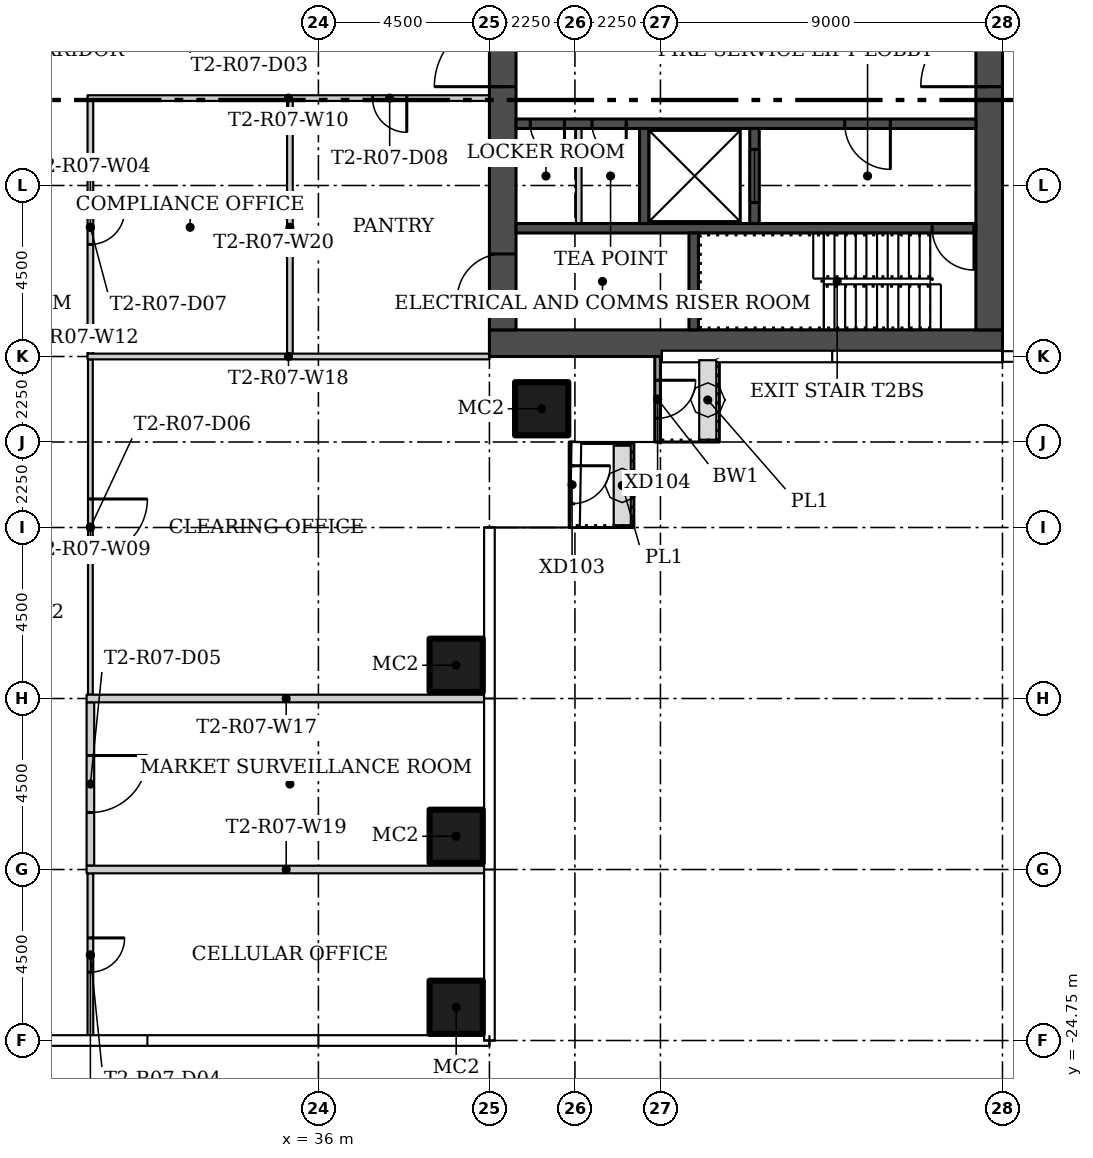
"""IFC4 building model, lengths in metres.
Left out: names, types, materials, properties, quantities, classifications, styles, units other than length and angle.
Written with IfcOpenShell. Run it as: python <this file> out.ifc"""

import sys

from ifc_helpers import new_model, si_unit, direction, frame, frame_2d, origin, origin_2d, place, context, subcontext, project, spatial, rectangle, hollow_rectangle, extrude, element, fill, save


model = new_model("IFC4")
c1 = context("Model", 3, precision=1e-05, world=origin(), true_north=direction((0.0, 1.0)))
c2 = subcontext(c1, "Body", "Model", "MODEL_VIEW")
j1 = project(units=[si_unit("LENGTHUNIT", "METRE"), si_unit("PLANEANGLEUNIT", "RADIAN")], contexts=[c1])
p1 = place(None, origin())
s1 = spatial("IfcSite", under=j1, at=p1, CompositionType="ELEMENT")
p2 = place(p1, origin())
s2 = spatial("IfcBuilding", under=s1, at=p2, CompositionType="ELEMENT")
p3 = place(p2, frame((0.0, 0.0, 73.2)))
s3 = spatial("IfcBuildingStorey", under=s2, at=p3, CompositionType="ELEMENT", Elevation=73.2)
for number, where in (
    (1, (41.875, -8.125, 0.0)),
    (2, (39.625, -14.875, 0.0)),
    (3, (39.625, -19.375, 0.0)),
    (4, (39.625, -23.875, 0.0)),
):
    element("IfcColumn", number, at=place(p3, frame(where)), inside=s3, PredefinedType="COLUMN", context=c2, shape_type="SweptSolid", body=[
        extrude(hollow_rectangle(XDim=1.4, YDim=1.4, WallThickness=0.05, at=origin_2d()), origin(), (0.0, 0.0, 1.0), 3.45),
    ])
p4 = place(p3, frame((30.0, -15.85, 0.0), z_axis=(0.0, 0.0, 1.0), x_axis=(0.0, -1.0, 0.0)))
e5 = element("IfcWall", 5, at=p4, inside=s3, PredefinedType="PARTITIONING", context=c2, shape_type="SweptSolid", body=[
    extrude(rectangle(XDim=4.3, YDim=0.2, at=frame_2d((2.15, 0.0))), origin(), (0.0, 0.0, 1.0), 3.45),
])
p5 = place(p4, frame((1.4, 0.0, 0.0)))
e6 = element("IfcOpeningElement", 6, at=p5, cuts=e5, PredefinedType="OPENING", context=c2, shape_type="SweptSolid", body=[
    extrude(rectangle(XDim=1.5, YDim=2.1, at=frame_2d((0.75, 1.05))), frame((0.0, 0.11, 0.0), z_axis=(0.0, -1.0, 0.0), x_axis=(1.0, 0.0, 0.0)), (0.0, 0.0, 1.0), 0.22),
])
p6 = place(p3, frame((30.0, -20.35, 0.0), z_axis=(0.0, 0.0, 1.0), x_axis=(0.0, -1.0, 0.0)))
e7 = element("IfcWall", 7, at=p6, inside=s3, PredefinedType="PARTITIONING", context=c2, shape_type="SweptSolid", body=[
    extrude(rectangle(XDim=4.305, YDim=0.15, at=frame_2d((2.152, 0.0))), origin(), (0.0, 0.0, 1.0), 3.45),
])
p7 = place(p6, frame((1.7, 0.0, 0.0)))
e8 = element("IfcOpeningElement", 8, at=p7, cuts=e7, PredefinedType="OPENING", context=c2, shape_type="SweptSolid", body=[
    extrude(rectangle(XDim=0.9, YDim=2.1, at=frame_2d((0.45, 1.05))), frame((0.0, 0.085, 0.0), z_axis=(0.0, -1.0, 0.0), x_axis=(1.0, 0.0, 0.0)), (0.0, 0.0, 1.0), 0.17),
])
p8 = place(p3, frame((30.0, -0.025, 0.0), z_axis=(0.0, 0.0, 1.0), x_axis=(0.0, -1.0, 0.0)))
e9 = element("IfcWall", 9, at=p8, inside=s3, PredefinedType="PARTITIONING", context=c2, shape_type="SweptSolid", body=[
    extrude(rectangle(XDim=6.65, YDim=0.15, at=frame_2d((3.325, 0.0))), origin(), (0.0, 0.0, 1.0), 3.45),
])
p9 = place(p8, frame((2.875, 0.0, 0.0)))
e10 = element("IfcOpeningElement", 10, at=p9, cuts=e9, PredefinedType="OPENING", context=c2, shape_type="SweptSolid", body=[
    extrude(rectangle(XDim=0.9, YDim=2.1, at=frame_2d((0.45, 1.05))), frame((0.0, 0.085, 0.0), z_axis=(0.0, -1.0, 0.0), x_axis=(1.0, 0.0, 0.0)), (0.0, 0.0, 1.0), 0.17),
])
p10 = place(p3, frame((30.0, -6.825, 0.0), z_axis=(0.0, 0.0, 1.0), x_axis=(0.0, -1.0, 0.0)))
e11 = element("IfcWall", 11, at=p10, inside=s3, PredefinedType="PARTITIONING", context=c2, shape_type="SweptSolid", body=[
    extrude(rectangle(XDim=8.825, YDim=0.125, at=frame_2d((4.413, 0.0))), origin(), (0.0, 0.0, 1.0), 3.45),
])
p11 = place(p10, frame((3.675, 0.0, 0.0)))
e12 = element("IfcOpeningElement", 12, at=p11, cuts=e11, PredefinedType="OPENING", context=c2, shape_type="SweptSolid", body=[
    extrude(rectangle(XDim=1.5, YDim=2.1, at=frame_2d((0.75, 1.05))), frame((0.0, 0.073, 0.0), z_axis=(0.0, -1.0, 0.0), x_axis=(1.0, 0.0, 0.0)), (0.0, 0.0, 1.0), 0.145),
])
p12 = place(p3, frame((40.5, 0.05, 0.0), z_axis=(0.0, 0.0, 1.0), x_axis=(-1.0, 0.0, 0.0)))
e13 = element("IfcWall", 13, at=p12, inside=s3, PredefinedType="PARTITIONING", context=c2, shape_type="SweptSolid", body=[
    extrude(rectangle(XDim=10.575, YDim=0.15, at=frame_2d((5.288, 0.0))), origin(), (0.0, 0.0, 1.0), 3.45),
])
p13 = place(p12, frame((2.175, 0.0, 0.0)))
e14 = element("IfcOpeningElement", 14, at=p13, cuts=e13, PredefinedType="OPENING", context=c2, shape_type="SweptSolid", body=[
    extrude(rectangle(XDim=0.9, YDim=2.1, at=frame_2d((0.45, 1.05))), frame((0.0, 0.085, 0.0), z_axis=(0.0, -1.0, 0.0), x_axis=(1.0, 0.0, 0.0)), (0.0, 0.0, 1.0), 0.17),
])
p14 = place(p3, frame((29.9, -15.75, 0.0)))
e15 = element("IfcWall", 15, at=p14, inside=s3, PredefinedType="PARTITIONING", context=c2, shape_type="SweptSolid", body=[
    extrude(rectangle(XDim=10.505, YDim=0.2, at=frame_2d((5.252, 0.0))), origin(), (0.0, 0.0, 1.0), 3.45),
])
p15 = place(p3, frame((40.5, -6.75, 0.0), z_axis=(0.0, 0.0, 1.0), x_axis=(-1.0, 0.0, 0.0)))
e16 = element("IfcWall", 16, at=p15, inside=s3, PredefinedType="PARTITIONING", context=c2, shape_type="SweptSolid", body=[
    extrude(rectangle(XDim=10.575, YDim=0.15, at=frame_2d((5.288, 0.0))), origin(), (0.0, 0.0, 1.0), 3.45),
])
p16 = place(p3, frame((29.9, -20.25, 0.0)))
e17 = element("IfcWall", 17, at=p16, inside=s3, PredefinedType="PARTITIONING", context=c2, shape_type="SweptSolid", body=[
    extrude(rectangle(XDim=10.505, YDim=0.2, at=frame_2d((5.252, 0.0))), origin(), (0.0, 0.0, 1.0), 3.45),
])
p17 = place(p3, frame((35.25, -0.025, 0.0), z_axis=(0.0, 0.0, 1.0), x_axis=(0.0, -1.0, 0.0)))
e18 = element("IfcWall", 18, at=p17, inside=s3, PredefinedType="PARTITIONING", context=c2, shape_type="SweptSolid", body=[
    extrude(rectangle(XDim=6.65, YDim=0.15, at=frame_2d((3.325, 0.0))), origin(), (0.0, 0.0, 1.0), 3.45),
])
p18 = place(p3, frame((42.675, -9.0, 0.0), z_axis=(0.0, 0.0, 1.0), x_axis=(0.0, -1.0, 0.0)))
e19 = element("IfcWall", 19, at=p18, inside=s3, PredefinedType="SOLIDWALL", context=c2, shape_type="SweptSolid", body=[
    extrude(rectangle(XDim=2.25, YDim=0.15, at=frame_2d((1.125, 0.0))), origin(), (0.0, 0.0, 1.0), 3.45),
])
p19 = place(p18, frame((0.625, 0.0, 0.0)))
e20 = element("IfcOpeningElement", 20, at=p19, cuts=e19, PredefinedType="OPENING", context=c2, shape_type="SweptSolid", body=[
    extrude(rectangle(XDim=1.0, YDim=2.4, at=frame_2d((0.5, 1.2))), frame((0.0, 0.085, 0.0), z_axis=(0.0, -1.0, 0.0), x_axis=(1.0, 0.0, 0.0)), (0.0, 0.0, 1.0), 0.17),
])
p20 = place(p3, frame((44.925, -6.743, 0.0), z_axis=(0.0, 0.0, 1.0), x_axis=(0.0, -1.0, 0.0)))
e21 = element("IfcWall", 21, at=p20, inside=s3, PredefinedType="SOLIDWALL", context=c2, shape_type="SweptSolid", body=[
    extrude(rectangle(XDim=2.257, YDim=0.15, at=frame_2d((1.128, 0.0))), origin(), (0.0, 0.0, 1.0), 3.45),
])
p21 = place(p20, frame((0.632, 0.0, 0.0)))
e22 = element("IfcOpeningElement", 22, at=p21, cuts=e21, PredefinedType="OPENING", context=c2, shape_type="SweptSolid", body=[
    extrude(rectangle(XDim=1.0, YDim=2.4, at=frame_2d((0.5, 1.2))), frame((0.0, 0.085, 0.0), z_axis=(0.0, -1.0, 0.0), x_axis=(1.0, 0.0, 0.0)), (0.0, 0.0, 1.0), 0.17),
])
p22 = place(p3, frame((54.0, -6.4, 0.0), z_axis=(0.0, 0.0, 1.0), x_axis=(-1.0, 0.0, 0.0)))
e23 = element("IfcWall", 23, at=p22, inside=s3, PredefinedType="SHEAR", context=c2, shape_type="SweptSolid", body=[
    extrude(rectangle(XDim=13.5, YDim=0.7, at=frame_2d((6.75, 0.0))), origin(), (0.0, 0.0, 1.0), 3.45),
])
p23 = place(p3, frame((53.65, -6.05, 0.0), z_axis=(0.0, 0.0, 1.0), x_axis=(0.0, 1.0, 0.0)))
e24 = element("IfcWall", 24, at=p23, inside=s3, PredefinedType="SHEAR", context=c2, shape_type="SweptSolid", body=[
    extrude(rectangle(XDim=12.1, YDim=0.7, at=frame_2d((6.05, 0.0))), origin(), (0.0, 0.0, 1.0), 3.45),
])
p24 = place(p23, frame((6.4, 0.0, 0.0)))
e25 = element("IfcOpeningElement", 25, at=p24, cuts=e24, PredefinedType="OPENING", context=c2, shape_type="SweptSolid", body=[
    extrude(rectangle(XDim=1.8, YDim=2.4, at=frame_2d((0.9, 1.2))), frame((0.0, 0.36, 0.0), z_axis=(0.0, -1.0, 0.0), x_axis=(1.0, 0.0, 0.0)), (0.0, 0.0, 1.0), 0.72),
])
p25 = place(p3, frame((40.85, -6.05, 0.0), z_axis=(0.0, 0.0, 1.0), x_axis=(0.0, 1.0, 0.0)))
e26 = element("IfcWall", 26, at=p25, inside=s3, PredefinedType="SHEAR", context=c2, shape_type="SweptSolid", body=[
    extrude(rectangle(XDim=12.1, YDim=0.7, at=frame_2d((6.05, 0.0))), origin(), (0.0, 0.0, 1.0), 3.45),
])
p26 = place(p25, frame((0.8, 0.0, 0.0)))
e27 = element("IfcOpeningElement", 27, at=p26, cuts=e26, PredefinedType="OPENING", context=c2, shape_type="SweptSolid", body=[
    extrude(rectangle(XDim=1.2, YDim=2.1, at=frame_2d((0.6, 1.05))), frame((0.0, 0.36, 0.0), z_axis=(0.0, -1.0, 0.0), x_axis=(1.0, 0.0, 0.0)), (0.0, 0.0, 1.0), 0.72),
])
p27 = place(p25, frame((6.4, 0.0, 0.0)))
e28 = element("IfcOpeningElement", 28, at=p27, cuts=e26, PredefinedType="OPENING", context=c2, shape_type="SweptSolid", body=[
    extrude(rectangle(XDim=1.8, YDim=2.4, at=frame_2d((0.9, 1.2))), frame((0.0, 0.36, 0.0), z_axis=(0.0, -1.0, 0.0), x_axis=(1.0, 0.0, 0.0)), (0.0, 0.0, 1.0), 0.72),
])
p28 = place(p3, frame((53.3, -3.375, 0.0), z_axis=(0.0, 0.0, 1.0), x_axis=(-1.0, 0.0, 0.0)))
e29 = element("IfcWall", 29, at=p28, inside=s3, PredefinedType="SHEAR", context=c2, shape_type="SweptSolid", body=[
    extrude(rectangle(XDim=12.1, YDim=0.25, at=frame_2d((6.05, 0.0))), origin(), (0.0, 0.0, 1.0), 3.45),
])
p29 = place(p28, frame((0.05, 0.0, 0.0)))
e30 = element("IfcOpeningElement", 30, at=p29, cuts=e29, PredefinedType="OPENING", context=c2, shape_type="SweptSolid", body=[
    extrude(rectangle(XDim=1.1, YDim=2.1, at=frame_2d((0.55, 1.05))), frame((0.0, 0.135, 0.0), z_axis=(0.0, -1.0, 0.0), x_axis=(1.0, 0.0, 0.0)), (0.0, 0.0, 1.0), 0.27),
])
p30 = place(p3, frame((45.875, -6.05, 0.0), z_axis=(0.0, 0.0, 1.0), x_axis=(0.0, 1.0, 0.0)))
e31 = element("IfcWall", 31, at=p30, inside=s3, PredefinedType="SHEAR", context=c2, shape_type="SweptSolid", body=[
    extrude(rectangle(XDim=2.55, YDim=0.25, at=frame_2d((1.275, 0.0))), origin(), (0.0, 0.0, 1.0), 3.45),
])
p31 = place(p3, frame((53.3, -0.625, 0.0), z_axis=(0.0, 0.0, 1.0), x_axis=(-1.0, 0.0, 0.0)))
e32 = element("IfcWall", 32, at=p31, inside=s3, PredefinedType="SHEAR", context=c2, shape_type="SweptSolid", body=[
    extrude(rectangle(XDim=12.1, YDim=0.25, at=frame_2d((6.05, 0.0))), origin(), (0.0, 0.0, 1.0), 3.45),
])
p32 = place(p31, frame((2.25, 0.0, 0.0)))
e33 = element("IfcOpeningElement", 33, at=p32, cuts=e32, PredefinedType="OPENING", context=c2, shape_type="SweptSolid", body=[
    extrude(rectangle(XDim=1.2, YDim=2.1, at=frame_2d((0.6, 1.05))), frame((0.0, 0.135, 0.0), z_axis=(0.0, -1.0, 0.0), x_axis=(1.0, 0.0, 0.0)), (0.0, 0.0, 1.0), 0.27),
])
p33 = place(p31, frame((9.2, 0.0, 0.0)))
e34 = element("IfcOpeningElement", 34, at=p33, cuts=e32, PredefinedType="OPENING", context=c2, shape_type="SweptSolid", body=[
    extrude(rectangle(XDim=0.9, YDim=2.1, at=frame_2d((0.45, 1.05))), frame((0.0, 0.135, 0.0), z_axis=(0.0, -1.0, 0.0), x_axis=(1.0, 0.0, 0.0)), (0.0, 0.0, 1.0), 0.27),
])
p34 = place(p31, frame((10.825, 0.0, 0.0)))
e35 = element("IfcOpeningElement", 35, at=p34, cuts=e32, PredefinedType="OPENING", context=c2, shape_type="SweptSolid", body=[
    extrude(rectangle(XDim=0.9, YDim=2.1, at=frame_2d((0.45, 1.05))), frame((0.0, 0.135, 0.0), z_axis=(0.0, -1.0, 0.0), x_axis=(1.0, 0.0, 0.0)), (0.0, 0.0, 1.0), 0.27),
])
p35 = place(p3, frame((47.475, -3.25, 0.0), z_axis=(0.0, 0.0, 1.0), x_axis=(0.0, 1.0, 0.0)))
e36 = element("IfcWall", 36, at=p35, inside=s3, PredefinedType="SHEAR", context=c2, shape_type="SweptSolid", body=[
    extrude(rectangle(XDim=2.5, YDim=0.25, at=frame_2d((1.25, 0.0))), origin(), (0.0, 0.0, 1.0), 3.45),
])
p36 = place(p35, frame((0.55, 0.0, 0.0)))
e37 = element("IfcOpeningElement", 37, at=p36, cuts=e36, PredefinedType="OPENING", context=c2, shape_type="SweptSolid", body=[
    extrude(rectangle(XDim=1.4, YDim=2.4, at=frame_2d((0.7, 1.2))), frame((0.0, 0.135, 0.0), z_axis=(0.0, -1.0, 0.0), x_axis=(1.0, 0.0, 0.0)), (0.0, 0.0, 1.0), 0.27),
])
p37 = place(p3, frame((44.575, -3.25, 0.0), z_axis=(0.0, 0.0, 1.0), x_axis=(0.0, 1.0, 0.0)))
e38 = element("IfcWall", 38, at=p37, inside=s3, PredefinedType="SHEAR", context=c2, shape_type="SweptSolid", body=[
    extrude(rectangle(XDim=2.5, YDim=0.25, at=frame_2d((1.25, 0.0))), origin(), (0.0, 0.0, 1.0), 3.45),
])
p38 = place(p3, frame((42.85, -3.25, 0.0), z_axis=(0.0, 0.0, 1.0), x_axis=(0.0, 1.0, 0.0)))
e39 = element("IfcWall", 39, at=p38, inside=s3, PredefinedType="PARTITIONING", context=c2, shape_type="SweptSolid", body=[
    extrude(rectangle(XDim=2.5, YDim=0.15, at=frame_2d((1.25, 0.0))), origin(), (0.0, 0.0, 1.0), 3.45),
])
p39 = place(p7, origin())
e40 = element("IfcDoor", 40, at=p39, inside=s3, OperationType="SINGLE_SWING_RIGHT", PredefinedType="DOOR", context=c2, shape_type="SweptSolid", body=[
    extrude(rectangle(XDim=0.9, YDim=2.1, at=frame_2d((0.45, 1.05))), frame((0.0, 0.025, 0.0), z_axis=(0.0, -1.0, 0.0), x_axis=(1.0, 0.0, 0.0)), (0.0, 0.0, 1.0), 0.05),
])
fill(e8, e40)
p40 = place(p5, origin())
e41 = element("IfcDoor", 41, at=p40, inside=s3, OperationType="DOUBLE_DOOR_SINGLE_SWING", PredefinedType="DOOR", context=c2, shape_type="SweptSolid", body=[
    extrude(rectangle(XDim=1.5, YDim=2.1, at=frame_2d((0.75, 1.05))), frame((0.0, 0.025, 0.0), z_axis=(0.0, -1.0, 0.0), x_axis=(1.0, 0.0, 0.0)), (0.0, 0.0, 1.0), 0.05),
])
fill(e6, e41)
p41 = place(p11, origin())
e42 = element("IfcDoor", 42, at=p41, inside=s3, OperationType="DOUBLE_DOOR_SINGLE_SWING", PredefinedType="DOOR", context=c2, shape_type="SweptSolid", body=[
    extrude(rectangle(XDim=1.5, YDim=2.1, at=frame_2d((0.75, 1.05))), frame((0.0, 0.025, 0.0), z_axis=(0.0, -1.0, 0.0), x_axis=(1.0, 0.0, 0.0)), (0.0, 0.0, 1.0), 0.05),
])
fill(e12, e42)
p42 = place(p9, origin())
e43 = element("IfcDoor", 43, at=p42, inside=s3, OperationType="SINGLE_SWING_LEFT", PredefinedType="DOOR", context=c2, shape_type="SweptSolid", body=[
    extrude(rectangle(XDim=0.9, YDim=2.1, at=frame_2d((0.45, 1.05))), frame((0.0, 0.025, 0.0), z_axis=(0.0, -1.0, 0.0), x_axis=(1.0, 0.0, 0.0)), (0.0, 0.0, 1.0), 0.05),
])
fill(e10, e43)
p43 = place(p13, origin())
e44 = element("IfcDoor", 44, at=p43, inside=s3, OperationType="SINGLE_SWING_RIGHT", PredefinedType="DOOR", context=c2, shape_type="SweptSolid", body=[
    extrude(rectangle(XDim=0.9, YDim=2.1, at=frame_2d((0.45, 1.05))), frame((0.0, 0.025, 0.0), z_axis=(0.0, -1.0, 0.0), x_axis=(1.0, 0.0, 0.0)), (0.0, 0.0, 1.0), 0.05),
])
fill(e14, e44)
p44 = place(p19, origin())
e45 = element("IfcDoor", 45, at=p44, inside=s3, OperationType="SINGLE_SWING_LEFT", PredefinedType="DOOR", context=c2, shape_type="SweptSolid", body=[
    extrude(rectangle(XDim=1.0, YDim=2.4, at=frame_2d((0.5, 1.2))), frame((0.0, 0.025, 0.0), z_axis=(0.0, -1.0, 0.0), x_axis=(1.0, 0.0, 0.0)), (0.0, 0.0, 1.0), 0.05),
])
fill(e20, e45)
p45 = place(p21, origin())
e46 = element("IfcDoor", 46, at=p45, inside=s3, OperationType="SINGLE_SWING_RIGHT", PredefinedType="DOOR", context=c2, shape_type="SweptSolid", body=[
    extrude(rectangle(XDim=1.0, YDim=2.4, at=frame_2d((0.5, 1.2))), frame((0.0, 0.025, 0.0), z_axis=(0.0, -1.0, 0.0), x_axis=(1.0, 0.0, 0.0)), (0.0, 0.0, 1.0), 0.05),
])
fill(e22, e46)
p46 = place(p24, origin())
e47 = element("IfcDoor", 47, at=p46, inside=s3, OperationType="DOUBLE_DOOR_SINGLE_SWING", PredefinedType="DOOR", context=c2, shape_type="SweptSolid", body=[
    extrude(rectangle(XDim=1.8, YDim=2.4, at=frame_2d((0.9, 1.2))), frame((0.0, 0.025, 0.0), z_axis=(0.0, -1.0, 0.0), x_axis=(1.0, 0.0, 0.0)), (0.0, 0.0, 1.0), 0.05),
])
fill(e25, e47)
p47 = place(p26, origin())
e48 = element("IfcDoor", 48, at=p47, inside=s3, OperationType="SINGLE_SWING_LEFT", PredefinedType="DOOR", context=c2, shape_type="SweptSolid", body=[
    extrude(rectangle(XDim=1.2, YDim=2.1, at=frame_2d((0.6, 1.05))), frame((0.0, 0.025, 0.0), z_axis=(0.0, -1.0, 0.0), x_axis=(1.0, 0.0, 0.0)), (0.0, 0.0, 1.0), 0.05),
])
fill(e27, e48)
p48 = place(p27, origin())
e49 = element("IfcDoor", 49, at=p48, inside=s3, OperationType="DOUBLE_DOOR_SINGLE_SWING", PredefinedType="DOOR", context=c2, shape_type="SweptSolid", body=[
    extrude(rectangle(XDim=1.8, YDim=2.4, at=frame_2d((0.9, 1.2))), frame((0.0, 0.025, 0.0), z_axis=(0.0, -1.0, 0.0), x_axis=(1.0, 0.0, 0.0)), (0.0, 0.0, 1.0), 0.05),
])
fill(e28, e49)
p49 = place(p29, origin())
e50 = element("IfcDoor", 50, at=p49, inside=s3, OperationType="SINGLE_SWING_LEFT", PredefinedType="DOOR", context=c2, shape_type="SweptSolid", body=[
    extrude(rectangle(XDim=1.1, YDim=2.1, at=frame_2d((0.55, 1.05))), frame((0.0, 0.025, 0.0), z_axis=(0.0, -1.0, 0.0), x_axis=(1.0, 0.0, 0.0)), (0.0, 0.0, 1.0), 0.05),
])
fill(e30, e50)
p50 = place(p32, origin())
e51 = element("IfcDoor", 51, at=p50, inside=s3, OperationType="SINGLE_SWING_LEFT", PredefinedType="DOOR", context=c2, shape_type="SweptSolid", body=[
    extrude(rectangle(XDim=1.2, YDim=2.1, at=frame_2d((0.6, 1.05))), frame((0.0, 0.025, 0.0), z_axis=(0.0, -1.0, 0.0), x_axis=(1.0, 0.0, 0.0)), (0.0, 0.0, 1.0), 0.05),
])
fill(e33, e51)
p51 = place(p33, origin())
e52 = element("IfcDoor", 52, at=p51, inside=s3, OperationType="SINGLE_SWING_RIGHT", PredefinedType="DOOR", context=c2, shape_type="SweptSolid", body=[
    extrude(rectangle(XDim=0.9, YDim=2.1, at=frame_2d((0.45, 1.05))), frame((0.0, 0.025, 0.0), z_axis=(0.0, -1.0, 0.0), x_axis=(1.0, 0.0, 0.0)), (0.0, 0.0, 1.0), 0.05),
])
fill(e34, e52)
p52 = place(p34, origin())
e53 = element("IfcDoor", 53, at=p52, inside=s3, OperationType="SINGLE_SWING_RIGHT", PredefinedType="DOOR", context=c2, shape_type="SweptSolid", body=[
    extrude(rectangle(XDim=0.9, YDim=2.1, at=frame_2d((0.45, 1.05))), frame((0.0, 0.025, 0.0), z_axis=(0.0, -1.0, 0.0), x_axis=(1.0, 0.0, 0.0)), (0.0, 0.0, 1.0), 0.05),
])
fill(e35, e53)
p53 = place(p36, origin())
e54 = element("IfcDoor", 54, at=p53, inside=s3, OperationType="SLIDING_TO_LEFT", PredefinedType="DOOR", context=c2, shape_type="SweptSolid", body=[
    extrude(rectangle(XDim=1.4, YDim=2.4, at=frame_2d((0.7, 1.2))), frame((0.0, 0.025, 0.0), z_axis=(0.0, -1.0, 0.0), x_axis=(1.0, 0.0, 0.0)), (0.0, 0.0, 1.0), 0.05),
])
fill(e37, e54)
save(model, sys.argv[1])
